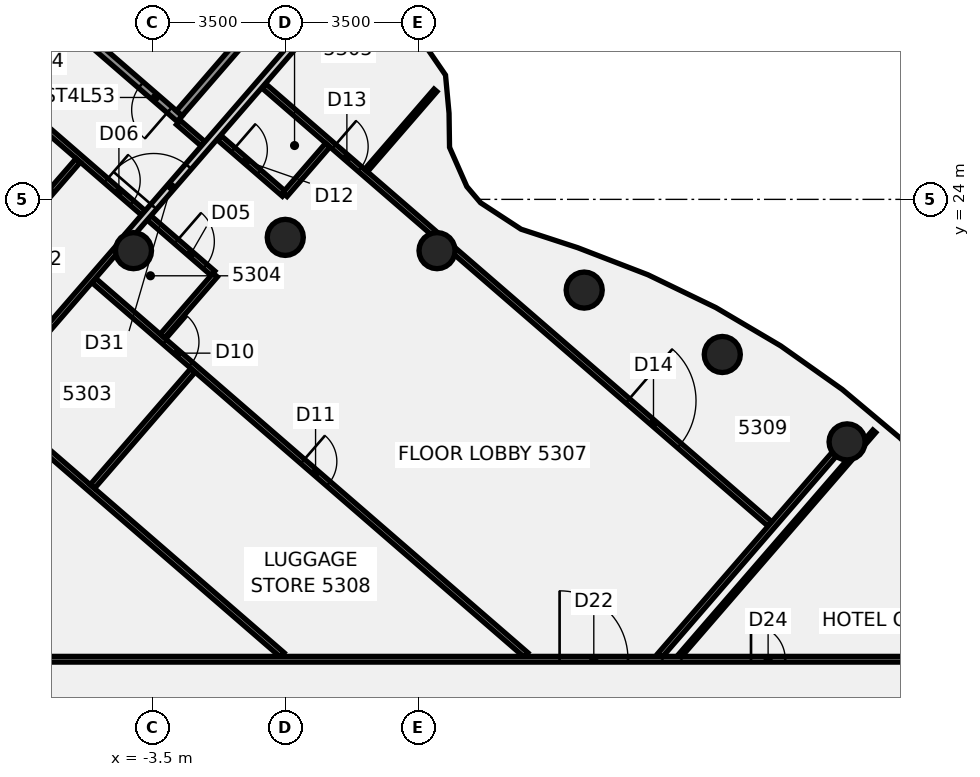
"""IFC4 building model, lengths in metres.
Left out: names, types, materials, properties, quantities, classifications, styles, units other than length and angle.
Written with IfcOpenShell. Run it as: python <this file> out.ifc"""

import sys

from ifc_helpers import new_model, si_unit, direction, frame, frame_2d, origin, origin_2d, place, context, subcontext, project, spatial, rectangle, circle, extrude, element, fill, save


model = new_model("IFC4")
c1 = context("Model", 3, precision=1e-05, world=origin(), true_north=direction((0.0, 1.0)))
c2 = subcontext(c1, "Body", "Model", "MODEL_VIEW")
j1 = project(units=[si_unit("LENGTHUNIT", "METRE"), si_unit("PLANEANGLEUNIT", "RADIAN")], contexts=[c1])
p1 = place(None, origin())
s1 = spatial("IfcSite", under=j1, at=p1, CompositionType="ELEMENT")
p2 = place(p1, origin())
s2 = spatial("IfcBuilding", under=s1, at=p2, CompositionType="ELEMENT")
p3 = place(p2, frame((0.0, 0.0, 211.3)))
s3 = spatial("IfcBuildingStorey", under=s2, at=p3, CompositionType="ELEMENT", Elevation=211.3)
for number, where, z_axis, x_axis in (
    (1, (14.784, 17.619, -0.14), (0.0, 0.0, 1.0), (1.0, 0.0, 0.0)),
    (2, (11.5, 19.919, -0.14), (0.0, 0.0, 1.0), (1.0, 0.0, 0.0)),
    (3, (7.866, 21.613, -0.14), (0.0, 0.0, 1.0), (1.0, 0.0, 0.0)),
    (4, (3.994, 22.651, -0.14), (0.0, 0.0, 1.0), (1.0, 0.0, 0.0)),
    (5, (0.0, 23.0, -0.14), (0.0, 0.0, 1.0), (1.0, 0.0, 0.0)),
    (6, (-3.994, 22.651, -0.14), (0.0, 0.0, 1.0), (1.0, 0.0, 0.0)),
):
    element("IfcColumn", number, at=place(p3, frame(where, z_axis=z_axis, x_axis=x_axis)), inside=s3, PredefinedType="COLUMN", context=c2, shape_type="SweptSolid", body=[
        extrude(circle(Radius=0.475, at=origin_2d()), origin(), (0.0, 0.0, 1.0), 3.56),
    ])
p4 = place(p3, frame((-12.241, 22.547, 0.0), z_axis=(0.0, 0.0, 1.0), x_axis=(0.7559218532, -0.6546618607, 0.0)))
e7 = element("IfcWall", 7, at=p4, inside=s3, PredefinedType="PARTITIONING", context=c2, shape_type="SweptSolid", body=[
    extrude(rectangle(XDim=16.089, YDim=0.15, at=frame_2d((8.044, 0.0))), origin(), (0.0, 0.0, 1.0), 2.824),
])
p5 = place(p3, frame((-10.4, 29.421, 0.0), z_axis=(0.0, 0.0, 1.0), x_axis=(0.755729912983, -0.654883423689, 0.0)))
e8 = element("IfcWall", 8, at=p5, inside=s3, PredefinedType="PARTITIONING", context=c2, shape_type="SweptSolid", body=[
    extrude(rectangle(XDim=11.245, YDim=0.15, at=frame_2d((5.623, 0.0))), origin(), (0.0, 0.0, 1.0), 2.72),
])
p6 = place(p5, frame((9.97, 0.0, 0.0)))
e9 = element("IfcOpeningElement", 9, at=p6, cuts=e8, PredefinedType="OPENING", context=c2, shape_type="SweptSolid", body=[
    extrude(rectangle(XDim=1.0, YDim=2.1, at=frame_2d((0.5, 1.05))), frame((0.0, 0.085, 0.0), z_axis=(0.0, -1.0, 0.0), x_axis=(1.0, 0.0, 0.0)), (0.0, 0.0, 1.0), 0.17),
])
p7 = place(p5, frame((7.52, 0.0, 0.0)))
e10 = element("IfcOpeningElement", 10, at=p7, cuts=e8, PredefinedType="OPENING", context=c2, shape_type="SweptSolid", body=[
    extrude(rectangle(XDim=0.9, YDim=2.1, at=frame_2d((0.45, 1.05))), frame((0.0, 0.085, 0.0), z_axis=(0.0, -1.0, 0.0), x_axis=(1.0, 0.0, 0.0)), (0.0, 0.0, 1.0), 0.17),
])
p8 = place(p5, frame((0.82, 0.0, 0.0)))
e11 = element("IfcOpeningElement", 11, at=p8, cuts=e8, PredefinedType="OPENING", context=c2, shape_type="SweptSolid", body=[
    extrude(rectangle(XDim=0.9, YDim=2.1, at=frame_2d((0.45, 1.05))), frame((0.0, 0.085, 0.0), z_axis=(0.0, -1.0, 0.0), x_axis=(1.0, 0.0, 0.0)), (0.0, 0.0, 1.0), 0.17),
])
p9 = place(p3, frame((-2.813, 26.024, 0.0), z_axis=(0.0, 0.0, 1.0), x_axis=(0.755941819498, -0.654638805399, 0.0)))
e12 = element("IfcWall", 12, at=p9, inside=s3, PredefinedType="PARTITIONING", context=c2, shape_type="SweptSolid", body=[
    extrude(rectangle(XDim=0.86, YDim=0.15, at=frame_2d((0.43, 0.0))), origin(), (0.0, 0.0, 1.0), 2.824),
])
p10 = place(p3, frame((-5.038, 21.865, 0.0), z_axis=(0.0, 0.0, 1.0), x_axis=(0.755861973067, -0.654730996419, 0.0)))
e13 = element("IfcWall", 13, at=p10, inside=s3, PredefinedType="PARTITIONING", context=c2, shape_type="SweptSolid", body=[
    extrude(rectangle(XDim=15.047, YDim=0.15, at=frame_2d((7.523, 0.0))), origin(), (0.0, 0.0, 1.0), 2.72),
])
p11 = place(p10, frame((2.47, 0.0, 0.0)))
e14 = element("IfcOpeningElement", 14, at=p11, cuts=e13, PredefinedType="OPENING", context=c2, shape_type="SweptSolid", body=[
    extrude(rectangle(XDim=0.9, YDim=2.1, at=frame_2d((0.45, 1.05))), frame((0.0, 0.085, 0.0), z_axis=(0.0, -1.0, 0.0), x_axis=(1.0, 0.0, 0.0)), (0.0, 0.0, 1.0), 0.17),
])
p12 = place(p10, frame((7.27, 0.0, 0.0)))
e15 = element("IfcOpeningElement", 15, at=p12, cuts=e13, PredefinedType="OPENING", context=c2, shape_type="SweptSolid", body=[
    extrude(rectangle(XDim=0.9, YDim=2.1, at=frame_2d((0.45, 1.05))), frame((0.0, 0.085, 0.0), z_axis=(0.0, -1.0, 0.0), x_axis=(1.0, 0.0, 0.0)), (0.0, 0.0, 1.0), 0.17),
])
p13 = place(p3, frame((-1.734, 25.618, 0.0), z_axis=(0.0, 0.0, 1.0), x_axis=(0.755959942228, -0.654617877656, 0.0)))
e16 = element("IfcWall", 16, at=p13, inside=s3, PredefinedType="PARTITIONING", context=c2, shape_type="SweptSolid", body=[
    extrude(rectangle(XDim=2.26, YDim=0.15, at=frame_2d((1.13, 0.0))), origin(), (0.0, 0.0, 1.0), 2.824),
])
p14 = place(p13, frame((0.48, 0.0, 0.0)))
e17 = element("IfcOpeningElement", 17, at=p14, cuts=e16, PredefinedType="OPENING", context=c2, shape_type="SweptSolid", body=[
    extrude(rectangle(XDim=0.9, YDim=2.1, at=frame_2d((0.45, 1.05))), frame((0.0, 0.085, 0.0), z_axis=(0.0, -1.0, 0.0), x_axis=(1.0, 0.0, 0.0)), (0.0, 0.0, 1.0), 0.17),
])
p15 = place(p3, frame((-0.556, 26.979, 0.0), z_axis=(0.0, 0.0, 1.0), x_axis=(0.75610536707, -0.654449901741, 0.0)))
e18 = element("IfcWall", 18, at=p15, inside=s3, PredefinedType="PARTITIONING", context=c2, shape_type="SweptSolid", body=[
    extrude(rectangle(XDim=6.054, YDim=0.15, at=frame_2d((3.027, 0.0))), origin(), (0.0, 0.0, 1.0), 2.824),
])
p16 = place(p15, frame((2.43, 0.0, 0.0)))
e19 = element("IfcOpeningElement", 19, at=p16, cuts=e18, PredefinedType="OPENING", context=c2, shape_type="SweptSolid", body=[
    extrude(rectangle(XDim=0.9, YDim=2.1, at=frame_2d((0.45, 1.05))), frame((0.0, 0.085, 0.0), z_axis=(0.0, -1.0, 0.0), x_axis=(1.0, 0.0, 0.0)), (0.0, 0.0, 1.0), 0.17),
])
p17 = place(p3, frame((4.362, 22.723, 0.0), z_axis=(0.0, 0.0, 1.0), x_axis=(0.756102728105, -0.654452950603, 0.0)))
e20 = element("IfcWall", 20, at=p17, inside=s3, PredefinedType="PARTITIONING", context=c2, shape_type="SweptSolid", body=[
    extrude(rectangle(XDim=11.096, YDim=0.15, at=frame_2d((5.548, 0.0))), origin(), (0.0, 0.0, 1.0), 2.824),
])
p18 = place(p17, frame((6.147, 0.0, 0.0)))
e21 = element("IfcOpeningElement", 21, at=p18, cuts=e20, PredefinedType="OPENING", context=c2, shape_type="SweptSolid", body=[
    extrude(rectangle(XDim=1.8, YDim=2.1, at=frame_2d((0.9, 1.05))), frame((0.0, 0.085, 0.0), z_axis=(0.0, -1.0, 0.0), x_axis=(1.0, 0.0, 0.0)), (0.0, 0.0, 1.0), 0.17),
])
p19 = place(p3, frame((-17.065, 11.9, 0.0), z_axis=(0.0, 0.0, 1.0), x_axis=(1.0, 0.0, 0.0)))
e22 = element("IfcWall", 22, at=p19, inside=s3, PredefinedType="PARTITIONING", context=c2, shape_type="SweptSolid", body=[
    extrude(rectangle(XDim=34.165, YDim=0.15, at=frame_2d((17.083, 0.0))), origin(), (0.0, 0.0, 1.0), 2.824),
])
p20 = place(p19, frame((24.284, 0.0, 0.0)))
e23 = element("IfcOpeningElement", 23, at=p20, cuts=e22, PredefinedType="OPENING", context=c2, shape_type="SweptSolid", body=[
    extrude(rectangle(XDim=1.8, YDim=2.1, at=frame_2d((0.9, 1.05))), frame((0.0, 0.085, 0.0), z_axis=(0.0, -1.0, 0.0), x_axis=(1.0, 0.0, 0.0)), (0.0, 0.0, 1.0), 0.17),
])
p21 = place(p19, frame((9.009, 0.0, 0.0)))
e24 = element("IfcOpeningElement", 24, at=p21, cuts=e22, PredefinedType="OPENING", context=c2, shape_type="SweptSolid", body=[
    extrude(rectangle(XDim=1.8, YDim=2.1, at=frame_2d((0.9, 1.05))), frame((0.0, 0.085, 0.0), z_axis=(0.0, -1.0, 0.0), x_axis=(1.0, 0.0, 0.0)), (0.0, 0.0, 1.0), 0.17),
])
p22 = place(p19, frame((29.321, 0.0, 0.0)))
e25 = element("IfcOpeningElement", 25, at=p22, cuts=e22, PredefinedType="OPENING", context=c2, shape_type="SweptSolid", body=[
    extrude(rectangle(XDim=0.9, YDim=2.1, at=frame_2d((0.45, 1.05))), frame((0.0, 0.085, 0.0), z_axis=(0.0, -1.0, 0.0), x_axis=(1.0, 0.0, 0.0)), (0.0, 0.0, 1.0), 0.17),
])
p23 = place(p19, frame((2.859, 0.0, 0.0)))
e26 = element("IfcOpeningElement", 26, at=p23, cuts=e22, PredefinedType="OPENING", context=c2, shape_type="SweptSolid", body=[
    extrude(rectangle(XDim=1.8, YDim=2.1, at=frame_2d((0.9, 1.05))), frame((0.0, 0.085, 0.0), z_axis=(0.0, -1.0, 0.0), x_axis=(1.0, 0.0, 0.0)), (0.0, 0.0, 1.0), 0.17),
])
p24 = place(p3, frame((-14.087, 25.286, 0.0), z_axis=(0.0, 0.0, 1.0), x_axis=(0.654652415454, 0.755930033099, 0.0)))
e27 = element("IfcWall", 27, at=p24, inside=s3, PredefinedType="PARTITIONING", context=c2, shape_type="SweptSolid", body=[
    extrude(rectangle(XDim=13.437, YDim=0.15, at=frame_2d((6.718, 0.0))), origin(), (0.0, 0.0, 1.0), 2.82),
])
p25 = place(p24, frame((5.838, 0.0, 0.0)))
e28 = element("IfcOpeningElement", 28, at=p25, cuts=e27, PredefinedType="OPENING", context=c2, shape_type="SweptSolid", body=[
    extrude(rectangle(XDim=1.8, YDim=2.1, at=frame_2d((0.9, 1.05))), frame((0.0, 0.085, 0.0), z_axis=(0.0, -1.0, 0.0), x_axis=(1.0, 0.0, 0.0)), (0.0, 0.0, 1.0), 0.17),
])
p26 = place(p3, frame((-7.796, 18.803, 0.0), z_axis=(0.0, 0.0, 1.0), x_axis=(0.654718163519, 0.755873088791, 0.0)))
e29 = element("IfcWall", 29, at=p26, inside=s3, PredefinedType="PARTITIONING", context=c2, shape_type="SweptSolid", body=[
    extrude(rectangle(XDim=5.165, YDim=0.15, at=frame_2d((2.583, 0.0))), origin(), (0.0, 0.0, 1.0), 2.72),
])
p27 = place(p3, frame((-4.119, 23.048, 0.0), z_axis=(0.0, 0.0, 1.0), x_axis=(0.654685276968, 0.755901573038, 0.0)))
e30 = element("IfcWall", 30, at=p27, inside=s3, PredefinedType="PARTITIONING", context=c2, shape_type="SweptSolid", body=[
    extrude(rectangle(XDim=8.604, YDim=0.2, at=frame_2d((4.302, 0.0))), origin(), (0.0, 0.0, 1.0), 2.82),
])
p28 = place(p27, frame((1.005, 0.0, 0.0)))
e31 = element("IfcOpeningElement", 31, at=p28, cuts=e30, PredefinedType="OPENING", context=c2, shape_type="SweptSolid", body=[
    extrude(rectangle(XDim=1.4, YDim=2.1, at=frame_2d((0.7, 1.05))), frame((0.0, 0.11, 0.0), z_axis=(0.0, -1.0, 0.0), x_axis=(1.0, 0.0, 0.0)), (0.0, 0.0, 1.0), 0.22),
])
p29 = place(p3, frame((-7.099, 23.121, 0.0), z_axis=(0.0, 0.0, 1.0), x_axis=(0.654764510889, 0.755832941384, 0.0)))
e32 = element("IfcWall", 32, at=p29, inside=s3, PredefinedType="PARTITIONING", context=c2, shape_type="SweptSolid", body=[
    extrude(rectangle(XDim=2.52, YDim=0.15, at=frame_2d((1.26, 0.0))), origin(), (0.0, 0.0, 1.0), 2.82),
])
p30 = place(p29, frame((0.6, 0.0, 0.0)))
e33 = element("IfcOpeningElement", 33, at=p30, cuts=e32, PredefinedType="OPENING", context=c2, shape_type="SweptSolid", body=[
    extrude(rectangle(XDim=0.9, YDim=2.1, at=frame_2d((0.45, 1.05))), frame((0.0, 0.085, 0.0), z_axis=(0.0, -1.0, 0.0), x_axis=(1.0, 0.0, 0.0)), (0.0, 0.0, 1.0), 0.17),
])
p31 = place(p3, frame((-5.075, 16.447, 0.0), z_axis=(0.0, 0.0, 1.0), x_axis=(0.654718867346, 0.755872479153, 0.0)))
e34 = element("IfcWall", 34, at=p31, inside=s3, PredefinedType="PARTITIONING", context=c2, shape_type="SweptSolid", body=[
    extrude(rectangle(XDim=4.04, YDim=0.15, at=frame_2d((2.02, 0.0))), origin(), (0.0, 0.0, 1.0), 2.824),
])
p32 = place(p3, frame((2.127, 24.761, 0.0), z_axis=(0.0, 0.0, 1.0), x_axis=(0.6546704231, 0.755914437696, 0.0)))
e35 = element("IfcWall", 35, at=p32, inside=s3, PredefinedType="PARTITIONING", context=c2, shape_type="SweptSolid", body=[
    extrude(rectangle(XDim=2.788, YDim=0.1, at=frame_2d((1.394, 0.0))), origin(), (0.0, 0.0, 1.0), 2.824),
])
p33 = place(p3, frame((-3.232, 20.407, 0.0), z_axis=(0.0, 0.0, 1.0), x_axis=(0.654842812105, 0.755765103345, 0.0)))
e36 = element("IfcWall", 36, at=p33, inside=s3, PredefinedType="PARTITIONING", context=c2, shape_type="SweptSolid", body=[
    extrude(rectangle(XDim=2.119, YDim=0.15, at=frame_2d((1.06, 0.0))), origin(), (0.0, 0.0, 1.0), 2.824),
])
p34 = place(p3, frame((-0.01, 24.125, 0.0), z_axis=(0.0, 0.0, 1.0), x_axis=(0.654860306773, 0.755749944501, 0.0)))
e37 = element("IfcWall", 37, at=p34, inside=s3, PredefinedType="PARTITIONING", context=c2, shape_type="SweptSolid", body=[
    extrude(rectangle(XDim=1.72, YDim=0.15, at=frame_2d((0.86, 0.0))), origin(), (0.0, 0.0, 1.0), 2.824),
])
p35 = place(p3, frame((10.385, 11.991, 0.0), z_axis=(0.0, 0.0, 1.0), x_axis=(0.654631052214, 0.755948533617, 0.0)))
e38 = element("IfcWall", 38, at=p35, inside=s3, PredefinedType="PARTITIONING", context=c2, shape_type="SweptSolid", body=[
    extrude(rectangle(XDim=6.829, YDim=0.1, at=frame_2d((3.415, 0.0))), origin(), (0.0, 0.0, 1.0), 2.824),
])
p36 = place(p3, frame((15.267, 17.628, 0.0), z_axis=(0.0, 0.0, 1.0), x_axis=(0.655060689761, 0.75557626533, 0.0)))
e39 = element("IfcWall", 39, at=p36, inside=s3, PredefinedType="PARTITIONING", context=c2, shape_type="SweptSolid", body=[
    extrude(rectangle(XDim=0.357, YDim=0.1, at=frame_2d((0.178, 0.0))), origin(), (0.0, 0.0, 1.0), 2.824),
])
p37 = place(p3, frame((9.865, 12.006, 0.0), z_axis=(0.0, 0.0, 1.0), x_axis=(0.654719299236, 0.75587210506, 0.0)))
e40 = element("IfcWall", 40, at=p37, inside=s3, PredefinedType="PARTITIONING", context=c2, shape_type="SweptSolid", body=[
    extrude(rectangle(XDim=6.997, YDim=0.15, at=frame_2d((3.499, 0.0))), origin(), (0.0, 0.0, 1.0), 2.824),
])
p38 = place(p3, frame((-2.777, 26.125, -0.14), z_axis=(0.0, 0.0, 1.0), x_axis=(-0.755905449716, 0.654680800918, 0.0)))
e41 = element("IfcWall", 41, at=p38, inside=s3, PredefinedType="SHEAR", context=c2, shape_type="SweptSolid", body=[
    extrude(rectangle(XDim=6.7, YDim=0.2, at=frame_2d((3.35, 0.0))), origin(), (0.0, 0.0, 1.0), 2.86),
])
p39 = place(p38, frame((0.35, 0.0, 0.0)))
e42 = element("IfcOpeningElement", 42, at=p39, cuts=e41, PredefinedType="OPENING", context=c2, shape_type="SweptSolid", body=[
    extrude(rectangle(XDim=1.0, YDim=2.1, at=frame_2d((0.5, 1.05))), frame((0.0, 0.11, 0.0), z_axis=(0.0, -1.0, 0.0), x_axis=(1.0, 0.0, 0.0)), (0.0, 0.0, 1.0), 0.22),
])
p40 = place(p3, frame((-0.692, 28.685, -0.14), z_axis=(0.0, 0.0, 1.0), x_axis=(-0.654715584954, -0.755875322271, 0.0)))
e43 = element("IfcWall", 43, at=p40, inside=s3, PredefinedType="SHEAR", context=c2, shape_type="SweptSolid", body=[
    extrude(rectangle(XDim=3.2, YDim=0.2, at=frame_2d((1.6, 0.0))), origin(), (0.0, 0.0, 1.0), 3.56),
])
p41 = place(p6, frame((1.0, 0.0, 0.0), z_axis=(0.0, 0.0, 1.0), x_axis=(-1.0, 0.0, 0.0)))
e44 = element("IfcDoor", 44, at=p41, inside=s3, OperationType="SINGLE_SWING_RIGHT", PredefinedType="DOOR", context=c2, shape_type="SweptSolid", body=[
    extrude(rectangle(XDim=1.0, YDim=2.1, at=frame_2d((0.5, 1.05))), frame((0.0, 0.025, 0.0), z_axis=(0.0, -1.0, 0.0), x_axis=(1.0, 0.0, 0.0)), (0.0, 0.0, 1.0), 0.05),
])
fill(e9, e44)
p42 = place(p7, frame((0.9, 0.0, 0.0), z_axis=(0.0, 0.0, 1.0), x_axis=(-1.0, 0.0, 0.0)))
e45 = element("IfcDoor", 45, at=p42, inside=s3, OperationType="SINGLE_SWING_RIGHT", PredefinedType="DOOR", context=c2, shape_type="SweptSolid", body=[
    extrude(rectangle(XDim=0.9, YDim=2.1, at=frame_2d((0.45, 1.05))), frame((0.0, 0.025, 0.0), z_axis=(0.0, -1.0, 0.0), x_axis=(1.0, 0.0, 0.0)), (0.0, 0.0, 1.0), 0.05),
])
fill(e10, e45)
p43 = place(p11, frame((0.9, 0.0, 0.0), z_axis=(0.0, 0.0, 1.0), x_axis=(-1.0, 0.0, 0.0)))
e46 = element("IfcDoor", 46, at=p43, inside=s3, OperationType="SINGLE_SWING_LEFT", PredefinedType="DOOR", context=c2, shape_type="SweptSolid", body=[
    extrude(rectangle(XDim=0.9, YDim=2.1, at=frame_2d((0.45, 1.05))), frame((0.0, 0.025, 0.0), z_axis=(0.0, -1.0, 0.0), x_axis=(1.0, 0.0, 0.0)), (0.0, 0.0, 1.0), 0.05),
])
fill(e14, e46)
p44 = place(p12, frame((0.9, 0.0, 0.0), z_axis=(0.0, 0.0, 1.0), x_axis=(-1.0, 0.0, 0.0)))
e47 = element("IfcDoor", 47, at=p44, inside=s3, OperationType="SINGLE_SWING_RIGHT", PredefinedType="DOOR", context=c2, shape_type="SweptSolid", body=[
    extrude(rectangle(XDim=0.9, YDim=2.1, at=frame_2d((0.45, 1.05))), frame((0.0, 0.025, 0.0), z_axis=(0.0, -1.0, 0.0), x_axis=(1.0, 0.0, 0.0)), (0.0, 0.0, 1.0), 0.05),
])
fill(e15, e47)
p45 = place(p14, origin())
e48 = element("IfcDoor", 48, at=p45, inside=s3, OperationType="SINGLE_SWING_RIGHT", PredefinedType="DOOR", context=c2, shape_type="SweptSolid", body=[
    extrude(rectangle(XDim=0.9, YDim=2.1, at=frame_2d((0.45, 1.05))), frame((0.0, 0.025, 0.0), z_axis=(0.0, -1.0, 0.0), x_axis=(1.0, 0.0, 0.0)), (0.0, 0.0, 1.0), 0.05),
])
fill(e17, e48)
p46 = place(p16, origin())
e49 = element("IfcDoor", 49, at=p46, inside=s3, OperationType="SINGLE_SWING_RIGHT", PredefinedType="DOOR", context=c2, shape_type="SweptSolid", body=[
    extrude(rectangle(XDim=0.9, YDim=2.1, at=frame_2d((0.45, 1.05))), frame((0.0, 0.025, 0.0), z_axis=(0.0, -1.0, 0.0), x_axis=(1.0, 0.0, 0.0)), (0.0, 0.0, 1.0), 0.05),
])
fill(e19, e49)
p47 = place(p18, origin())
e50 = element("IfcDoor", 50, at=p47, inside=s3, OperationType="DOUBLE_DOOR_SINGLE_SWING", PredefinedType="DOOR", context=c2, shape_type="SweptSolid", body=[
    extrude(rectangle(XDim=1.8, YDim=2.1, at=frame_2d((0.9, 1.05))), frame((0.0, 0.025, 0.0), z_axis=(0.0, -1.0, 0.0), x_axis=(1.0, 0.0, 0.0)), (0.0, 0.0, 1.0), 0.05),
])
fill(e21, e50)
p48 = place(p20, frame((1.8, 0.0, 0.0), z_axis=(0.0, 0.0, 1.0), x_axis=(-1.0, 0.0, 0.0)))
e51 = element("IfcDoor", 51, at=p48, inside=s3, OperationType="DOUBLE_DOOR_SINGLE_SWING", PredefinedType="DOOR", context=c2, shape_type="SweptSolid", body=[
    extrude(rectangle(XDim=1.8, YDim=2.1, at=frame_2d((0.9, 1.05))), frame((0.0, 0.025, 0.0), z_axis=(0.0, -1.0, 0.0), x_axis=(1.0, 0.0, 0.0)), (0.0, 0.0, 1.0), 0.05),
])
fill(e23, e51)
p49 = place(p22, origin())
e52 = element("IfcDoor", 52, at=p49, inside=s3, OperationType="SINGLE_SWING_LEFT", PredefinedType="DOOR", context=c2, shape_type="SweptSolid", body=[
    extrude(rectangle(XDim=0.9, YDim=2.1, at=frame_2d((0.45, 1.05))), frame((0.0, 0.025, 0.0), z_axis=(0.0, -1.0, 0.0), x_axis=(1.0, 0.0, 0.0)), (0.0, 0.0, 1.0), 0.05),
])
fill(e25, e52)
p50 = place(p28, frame((1.4, 0.0, 0.0), z_axis=(0.0, 0.0, 1.0), x_axis=(-1.0, 0.0, 0.0)))
e53 = element("IfcDoor", 53, at=p50, inside=s3, OperationType="DOUBLE_DOOR_SINGLE_SWING", PredefinedType="DOOR", context=c2, shape_type="SweptSolid", body=[
    extrude(rectangle(XDim=1.4, YDim=2.1, at=frame_2d((0.7, 1.05))), frame((0.0, 0.025, 0.0), z_axis=(0.0, -1.0, 0.0), x_axis=(1.0, 0.0, 0.0)), (0.0, 0.0, 1.0), 0.05),
])
fill(e31, e53)
p51 = place(p30, origin())
e54 = element("IfcDoor", 54, at=p51, inside=s3, OperationType="SINGLE_SWING_RIGHT", PredefinedType="DOOR", context=c2, shape_type="SweptSolid", body=[
    extrude(rectangle(XDim=0.9, YDim=2.1, at=frame_2d((0.45, 1.05))), frame((0.0, 0.025, 0.0), z_axis=(0.0, -1.0, 0.0), x_axis=(1.0, 0.0, 0.0)), (0.0, 0.0, 1.0), 0.05),
])
fill(e33, e54)
p52 = place(p39, origin())
e55 = element("IfcDoor", 55, at=p52, inside=s3, OperationType="SINGLE_SWING_LEFT", PredefinedType="DOOR", context=c2, shape_type="SweptSolid", body=[
    extrude(rectangle(XDim=1.0, YDim=2.1, at=frame_2d((0.5, 1.05))), frame((0.0, 0.025, 0.0), z_axis=(0.0, -1.0, 0.0), x_axis=(1.0, 0.0, 0.0)), (0.0, 0.0, 1.0), 0.05),
])
fill(e42, e55)
save(model, sys.argv[1])
